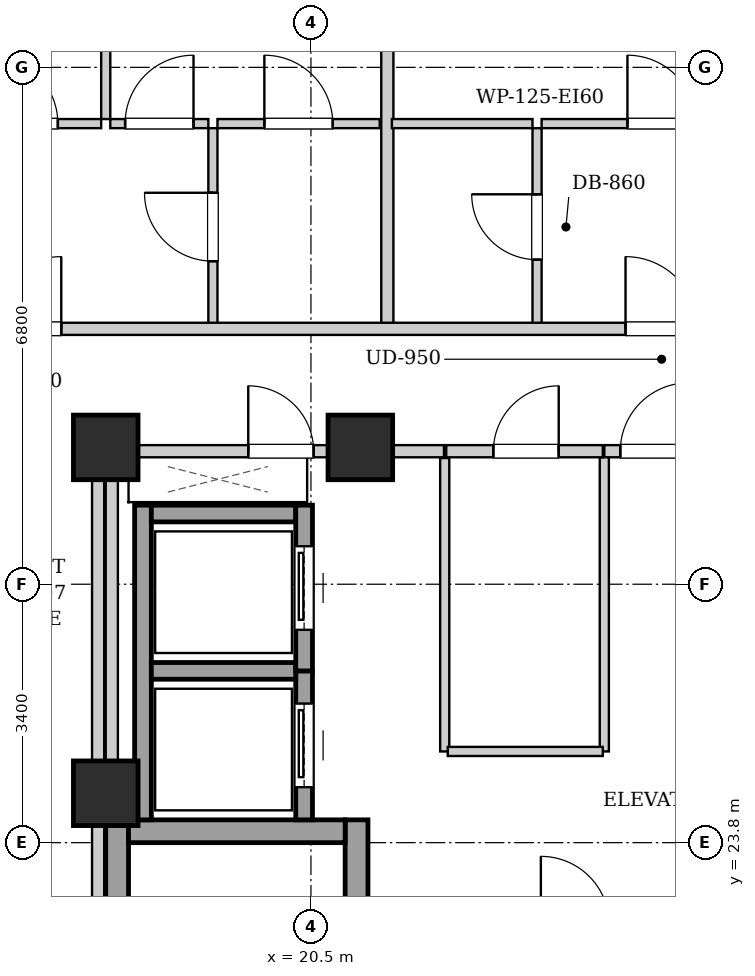
"""IFC4 building model, lengths in metres.
Left out: names, types, materials, properties, quantities, classifications, styles, units other than length and angle.
Written with IfcOpenShell. Run it as: python <this file> out.ifc"""

import sys

from ifc_helpers import new_model, si_unit, direction, frame, frame_2d, origin, origin_2d, place, context, subcontext, project, spatial, rectangle, extrude, element, fill, save


model = new_model("IFC4")
c1 = context("Model", 3, precision=1e-05, world=origin(), true_north=direction((0.0, 1.0)))
c2 = subcontext(c1, "Body", "Model", "MODEL_VIEW")
j1 = project(units=[si_unit("LENGTHUNIT", "METRE"), si_unit("PLANEANGLEUNIT", "RADIAN")], contexts=[c1])
p1 = place(None, origin())
s1 = spatial("IfcSite", under=j1, at=p1, CompositionType="ELEMENT")
p2 = place(p1, origin())
s2 = spatial("IfcBuilding", under=s1, at=p2, CompositionType="ELEMENT")
p3 = place(p2, frame((0.0, 0.0, 214.0)))
s3 = spatial("IfcBuildingStorey", under=s2, at=p3, CompositionType="ELEMENT", Elevation=214.0)
for number, where, z_axis, x_axis in (
    (1, (17.8, 29.0, 0.0), (0.0, 0.0, 1.0), (1.0, 0.0, 0.0)),
    (2, (21.15, 29.0, 0.0), (0.0, 0.0, 1.0), (1.0, 0.0, 0.0)),
    (3, (17.8, 24.45, 0.0), (0.0, 0.0, 1.0), (1.0, 0.0, 0.0)),
):
    element("IfcColumn", number, at=place(p3, frame(where, z_axis=z_axis, x_axis=x_axis)), inside=s3, PredefinedType="COLUMN", context=c2, shape_type="SweptSolid", body=[
        extrude(rectangle(XDim=0.85, YDim=0.85, at=origin_2d()), origin(), (0.0, 0.0, 1.0), 3.3),
    ])
for number, where, z_axis, x_axis in (
    (4, (17.95, 15.1, 0.0), (0.0, 0.0, 1.0), (0.0, 1.0, 0.0)),
    (5, (21.1, 15.1, 0.0), (0.0, 0.0, 1.0), (0.0, 1.0, 0.0)),
):
    element("IfcWall", number, at=place(p3, frame(where, z_axis=z_axis, x_axis=x_axis)), inside=s3, PredefinedType="SHEAR", context=c2, shape_type="SweptSolid", body=[
        extrude(rectangle(XDim=9.0, YDim=0.3, at=frame_2d((4.5, 0.0))), origin(), (0.0, 0.0, 1.0), 3.04),
    ])
p4 = place(p3, frame((18.1, 23.95, 0.0), z_axis=(0.0, 0.0, 1.0), x_axis=(1.0, 0.0, 0.0)))
e6 = element("IfcWall", 6, at=p4, inside=s3, PredefinedType="SHEAR", context=c2, shape_type="SweptSolid", body=[
    extrude(rectangle(XDim=2.85, YDim=0.3, at=frame_2d((1.425, 0.0))), origin(), (0.0, 0.0, 1.0), 3.04),
])
p5 = place(p3, frame((18.29, 24.1, 0.0), z_axis=(0.0, 0.0, 1.0), x_axis=(0.0, 1.0, 0.0)))
e7 = element("IfcWall", 7, at=p5, inside=s3, PredefinedType="SHEAR", context=c2, shape_type="SweptSolid", body=[
    extrude(rectangle(XDim=4.14, YDim=0.22, at=frame_2d((2.07, 0.0))), origin(), (0.0, 0.0, 1.0), 3.04),
])
p6 = place(p3, frame((20.41, 24.1, 0.0), z_axis=(0.0, 0.0, 1.0), x_axis=(0.0, 1.0, 0.0)))
e8 = element("IfcWall", 8, at=p6, inside=s3, PredefinedType="SHEAR", context=c2, shape_type="SweptSolid", body=[
    extrude(rectangle(XDim=1.96, YDim=0.22, at=frame_2d((0.98, 0.0))), origin(), (0.0, 0.0, 1.0), 3.04),
])
p7 = place(p6, frame((0.43, 0.0, 0.0)))
e9 = element("IfcOpeningElement", 9, at=p7, cuts=e8, PredefinedType="OPENING", context=c2, shape_type="SweptSolid", body=[
    extrude(rectangle(XDim=1.1, YDim=2.15, at=frame_2d((0.55, 1.075))), frame((0.0, 0.12, 0.0), z_axis=(0.0, -1.0, 0.0), x_axis=(1.0, 0.0, 0.0)), (0.0, 0.0, 1.0), 0.24),
])
for number, where, z_axis, x_axis in (
    (10, (18.4, 26.06, 0.0), (0.0, 0.0, 1.0), (1.0, 0.0, 0.0)),
    (11, (18.4, 28.13, 0.0), (0.0, 0.0, 1.0), (1.0, 0.0, 0.0)),
):
    element("IfcWall", number, at=place(p3, frame(where, z_axis=z_axis, x_axis=x_axis)), inside=s3, PredefinedType="SHEAR", context=c2, shape_type="SweptSolid", body=[
        extrude(rectangle(XDim=1.9, YDim=0.22, at=frame_2d((0.95, 0.0))), origin(), (0.0, 0.0, 1.0), 3.04),
    ])
p8 = place(p3, frame((20.41, 26.06, 0.0), z_axis=(0.0, 0.0, 1.0), x_axis=(0.0, 1.0, 0.0)))
e12 = element("IfcWall", 12, at=p8, inside=s3, PredefinedType="SHEAR", context=c2, shape_type="SweptSolid", body=[
    extrude(rectangle(XDim=2.18, YDim=0.22, at=frame_2d((1.09, 0.0))), origin(), (0.0, 0.0, 1.0), 3.04),
])
p9 = place(p8, frame((0.54, 0.0, 0.0)))
e13 = element("IfcOpeningElement", 13, at=p9, cuts=e12, PredefinedType="OPENING", context=c2, shape_type="SweptSolid", body=[
    extrude(rectangle(XDim=1.1, YDim=2.15, at=frame_2d((0.55, 1.075))), frame((0.0, 0.12, 0.0), z_axis=(0.0, -1.0, 0.0), x_axis=(1.0, 0.0, 0.0)), (0.0, 0.0, 1.0), 0.24),
])
p10 = place(p3, frame((17.88, 24.12, 0.0), z_axis=(0.0, 0.0, 1.0), x_axis=(0.0, 1.0, 0.0)))
e14 = element("IfcWall", 14, at=p10, inside=s3, PredefinedType="PARTITIONING", context=c2, shape_type="SweptSolid", body=[
    extrude(rectangle(XDim=4.76, YDim=0.16, at=frame_2d((2.38, 0.0))), origin(), (0.0, 0.0, 1.0), 3.04),
])
p11 = place(p3, frame((24.36, 28.95, 0.0), z_axis=(0.0, 0.0, 1.0), x_axis=(1.0, 0.0, 0.0)))
e15 = element("IfcWall", 15, at=p11, inside=s3, PredefinedType="PARTITIONING", context=c2, shape_type="SweptSolid", body=[
    extrude(rectangle(XDim=1.32, YDim=0.16, at=frame_2d((0.66, 0.0))), origin(), (0.0, 0.0, 1.0), 2.556),
])
p12 = place(p11, frame((0.21, 0.0, 0.0)))
e16 = element("IfcOpeningElement", 16, at=p12, cuts=e15, PredefinedType="OPENING", context=c2, shape_type="SweptSolid", body=[
    extrude(rectangle(XDim=0.9, YDim=2.05, at=frame_2d((0.45, 1.025))), frame((0.0, 0.09, 0.0), z_axis=(0.0, -1.0, 0.0), x_axis=(1.0, 0.0, 0.0)), (0.0, 0.0, 1.0), 0.18),
])
p13 = place(p3, frame((17.96, 28.95, 0.0), z_axis=(0.0, 0.0, 1.0), x_axis=(1.0, 0.0, 0.0)))
e17 = element("IfcWall", 17, at=p13, inside=s3, PredefinedType="PARTITIONING", context=c2, shape_type="SweptSolid", body=[
    extrude(rectangle(XDim=4.29, YDim=0.16, at=frame_2d((2.145, 0.0))), origin(), (0.0, 0.0, 1.0), 2.556),
])
p14 = place(p13, frame((1.715, 0.0, 0.0)))
e18 = element("IfcOpeningElement", 18, at=p14, cuts=e17, PredefinedType="OPENING", context=c2, shape_type="SweptSolid", body=[
    extrude(rectangle(XDim=0.86, YDim=2.05, at=frame_2d((0.43, 1.025))), frame((0.0, 0.09, 0.0), z_axis=(0.0, -1.0, 0.0), x_axis=(1.0, 0.0, 0.0)), (0.0, 0.0, 1.0), 0.18),
])
p15 = place(p3, frame((24.36, 25.0, 0.0), z_axis=(0.0, 0.0, 1.0), x_axis=(0.0, 1.0, 0.0)))
e19 = element("IfcWall", 19, at=p15, inside=s3, PredefinedType="PARTITIONING", context=c2, shape_type="SweptSolid", body=[
    extrude(rectangle(XDim=3.87, YDim=0.12, at=frame_2d((1.935, 0.0))), origin(), (0.0, 0.0, 1.0), 3.04),
])
p16 = place(p3, frame((22.26, 25.0, 0.0), z_axis=(0.0, 0.0, 1.0), x_axis=(0.0, 1.0, 0.0)))
e20 = element("IfcWall", 20, at=p16, inside=s3, PredefinedType="PARTITIONING", context=c2, shape_type="SweptSolid", body=[
    extrude(rectangle(XDim=3.86, YDim=0.12, at=frame_2d((1.93, 0.0))), origin(), (0.0, 0.0, 1.0), 3.04),
])
p17 = place(p3, frame((22.3, 25.0, 0.0), z_axis=(0.0, 0.0, 1.0), x_axis=(1.0, 0.0, 0.0)))
e21 = element("IfcWall", 21, at=p17, inside=s3, PredefinedType="PARTITIONING", context=c2, shape_type="SweptSolid", body=[
    extrude(rectangle(XDim=2.04, YDim=0.12, at=frame_2d((1.02, 0.0))), origin(), (0.0, 0.0, 1.0), 3.04),
])
p18 = place(p3, frame((22.28, 28.95, 0.0), z_axis=(0.0, 0.0, 1.0), x_axis=(1.0, 0.0, 0.0)))
e22 = element("IfcWall", 22, at=p18, inside=s3, PredefinedType="PARTITIONING", context=c2, shape_type="SweptSolid", body=[
    extrude(rectangle(XDim=2.06, YDim=0.16, at=frame_2d((1.03, 0.0))), origin(), (0.0, 0.0, 1.0), 2.556),
])
p19 = place(p18, frame((0.62, 0.0, 0.0)))
e23 = element("IfcOpeningElement", 23, at=p19, cuts=e22, PredefinedType="OPENING", context=c2, shape_type="SweptSolid", body=[
    extrude(rectangle(XDim=0.86, YDim=2.05, at=frame_2d((0.43, 1.025))), frame((0.0, 0.09, 0.0), z_axis=(0.0, -1.0, 0.0), x_axis=(1.0, 0.0, 0.0)), (0.0, 0.0, 1.0), 0.18),
])
p20 = place(p3, frame((19.21, 30.6, 0.0), z_axis=(0.0, 0.0, 1.0), x_axis=(0.0, 1.0, 0.0)))
e24 = element("IfcWall", 24, at=p20, inside=s3, PredefinedType="PARTITIONING", context=c2, shape_type="SweptSolid", body=[
    extrude(rectangle(XDim=2.6, YDim=0.12, at=frame_2d((1.3, 0.0))), origin(), (0.0, 0.0, 1.0), 3.04),
])
p21 = place(p20, frame((0.85, 0.0, 0.0)))
e25 = element("IfcOpeningElement", 25, at=p21, cuts=e24, PredefinedType="OPENING", context=c2, shape_type="SweptSolid", body=[
    extrude(rectangle(XDim=0.9, YDim=2.05, at=frame_2d((0.45, 1.025))), frame((0.0, 0.07, 0.0), z_axis=(0.0, -1.0, 0.0), x_axis=(1.0, 0.0, 0.0)), (0.0, 0.0, 1.0), 0.14),
])
p22 = place(p3, frame((15.7, 33.26, 0.0), z_axis=(0.0, 0.0, 1.0), x_axis=(1.0, 0.0, 0.0)))
e26 = element("IfcWall", 26, at=p22, inside=s3, PredefinedType="PARTITIONING", context=c2, shape_type="SweptSolid", body=[
    extrude(rectangle(XDim=2.04, YDim=0.12, at=frame_2d((1.02, 0.0))), origin(), (0.0, 0.0, 1.0), 3.04),
])
p23 = place(p22, frame((0.57, 0.0, 0.0)))
e27 = element("IfcOpeningElement", 27, at=p23, cuts=e26, PredefinedType="OPENING", context=c2, shape_type="SweptSolid", body=[
    extrude(rectangle(XDim=0.9, YDim=2.05, at=frame_2d((0.45, 1.025))), frame((0.0, 0.07, 0.0), z_axis=(0.0, -1.0, 0.0), x_axis=(1.0, 0.0, 0.0)), (0.0, 0.0, 1.0), 0.14),
])
p24 = place(p3, frame((17.86, 33.26, 0.0), z_axis=(0.0, 0.0, 1.0), x_axis=(1.0, 0.0, 0.0)))
e28 = element("IfcWall", 28, at=p24, inside=s3, PredefinedType="PARTITIONING", context=c2, shape_type="SweptSolid", body=[
    extrude(rectangle(XDim=1.29, YDim=0.12, at=frame_2d((0.645, 0.0))), origin(), (0.0, 0.0, 1.0), 3.04),
])
p25 = place(p24, frame((0.195, 0.0, 0.0)))
e29 = element("IfcOpeningElement", 29, at=p25, cuts=e28, PredefinedType="OPENING", context=c2, shape_type="SweptSolid", body=[
    extrude(rectangle(XDim=0.9, YDim=2.05, at=frame_2d((0.45, 1.025))), frame((0.0, 0.07, 0.0), z_axis=(0.0, -1.0, 0.0), x_axis=(1.0, 0.0, 0.0)), (0.0, 0.0, 1.0), 0.14),
])
p26 = place(p3, frame((19.27, 33.26, 0.0), z_axis=(0.0, 0.0, 1.0), x_axis=(1.0, 0.0, 0.0)))
e30 = element("IfcWall", 30, at=p26, inside=s3, PredefinedType="PARTITIONING", context=c2, shape_type="SweptSolid", body=[
    extrude(rectangle(XDim=2.135, YDim=0.12, at=frame_2d((1.067, 0.0))), origin(), (0.0, 0.0, 1.0), 3.04),
])
p27 = place(p26, frame((0.617, 0.0, 0.0)))
e31 = element("IfcOpeningElement", 31, at=p27, cuts=e30, PredefinedType="OPENING", context=c2, shape_type="SweptSolid", body=[
    extrude(rectangle(XDim=0.9, YDim=2.05, at=frame_2d((0.45, 1.025))), frame((0.0, 0.07, 0.0), z_axis=(0.0, -1.0, 0.0), x_axis=(1.0, 0.0, 0.0)), (0.0, 0.0, 1.0), 0.14),
])
p28 = place(p3, frame((17.8, 33.32, 0.0), z_axis=(0.0, 0.0, 1.0), x_axis=(0.0, 1.0, 0.0)))
e32 = element("IfcWall", 32, at=p28, inside=s3, PredefinedType="PARTITIONING", context=c2, shape_type="SweptSolid", body=[
    extrude(rectangle(XDim=6.6, YDim=0.12, at=frame_2d((3.3, 0.0))), origin(), (0.0, 0.0, 1.0), 2.556),
])
p29 = place(p28, frame((2.835, 0.0, 0.0)))
e33 = element("IfcOpeningElement", 33, at=p29, cuts=e32, PredefinedType="OPENING", context=c2, shape_type="SweptSolid", body=[
    extrude(rectangle(XDim=0.9, YDim=2.05, at=frame_2d((0.45, 1.025))), frame((0.0, 0.07, 0.0), z_axis=(0.0, -1.0, 0.0), x_axis=(1.0, 0.0, 0.0)), (0.0, 0.0, 1.0), 0.14),
])
p30 = place(p3, frame((21.505, 30.6, 0.0), z_axis=(0.0, 0.0, 1.0), x_axis=(0.0, 1.0, 0.0)))
e34 = element("IfcWall", 34, at=p30, inside=s3, PredefinedType="PARTITIONING", context=c2, shape_type="SweptSolid", body=[
    extrude(rectangle(XDim=9.32, YDim=0.16, at=frame_2d((4.66, 0.0))), origin(), (0.0, 0.0, 1.0), 3.04),
])
p31 = place(p3, frame((23.475, 30.6, 0.0), z_axis=(0.0, 0.0, 1.0), x_axis=(0.0, 1.0, 0.0)))
e35 = element("IfcWall", 35, at=p31, inside=s3, PredefinedType="PARTITIONING", context=c2, shape_type="SweptSolid", body=[
    extrude(rectangle(XDim=2.6, YDim=0.12, at=frame_2d((1.3, 0.0))), origin(), (0.0, 0.0, 1.0), 3.04),
])
p32 = place(p31, frame((0.87, 0.0, 0.0)))
e36 = element("IfcOpeningElement", 36, at=p32, cuts=e35, PredefinedType="OPENING", context=c2, shape_type="SweptSolid", body=[
    extrude(rectangle(XDim=0.86, YDim=2.05, at=frame_2d((0.43, 1.025))), frame((0.0, 0.07, 0.0), z_axis=(0.0, -1.0, 0.0), x_axis=(1.0, 0.0, 0.0)), (0.0, 0.0, 1.0), 0.14),
])
p33 = place(p3, frame((21.565, 33.26, 0.0), z_axis=(0.0, 0.0, 1.0), x_axis=(1.0, 0.0, 0.0)))
e37 = element("IfcWall", 37, at=p33, inside=s3, PredefinedType="PARTITIONING", context=c2, shape_type="SweptSolid", body=[
    extrude(rectangle(XDim=1.85, YDim=0.12, at=frame_2d((0.925, 0.0))), origin(), (0.0, 0.0, 1.0), 3.04),
])
p34 = place(p3, frame((23.535, 33.26, 0.0), z_axis=(0.0, 0.0, 1.0), x_axis=(1.0, 0.0, 0.0)))
e38 = element("IfcWall", 38, at=p34, inside=s3, PredefinedType="PARTITIONING", context=c2, shape_type="SweptSolid", body=[
    extrude(rectangle(XDim=3.157, YDim=0.12, at=frame_2d((1.579, 0.0))), origin(), (0.0, 0.0, 1.0), 3.04),
])
p35 = place(p34, frame((1.129, 0.0, 0.0)))
e39 = element("IfcOpeningElement", 39, at=p35, cuts=e38, PredefinedType="OPENING", context=c2, shape_type="SweptSolid", body=[
    extrude(rectangle(XDim=0.9, YDim=2.05, at=frame_2d((0.45, 1.025))), frame((0.0, 0.07, 0.0), z_axis=(0.0, -1.0, 0.0), x_axis=(1.0, 0.0, 0.0)), (0.0, 0.0, 1.0), 0.14),
])
p36 = place(p3, frame((13.15, 30.56, 0.0), z_axis=(0.0, 0.0, 1.0), x_axis=(1.0, 0.0, 0.0)))
e40 = element("IfcWall", 40, at=p36, inside=s3, PredefinedType="PARTITIONING", context=c2, shape_type="SweptSolid", body=[
    extrude(rectangle(XDim=24.6, YDim=0.16, at=frame_2d((12.3, 0.0))), origin(), (0.0, 0.0, 1.0), 3.04),
])
p37 = place(p36, frame((3.115, 0.0, 0.0)))
e41 = element("IfcOpeningElement", 41, at=p37, cuts=e40, PredefinedType="OPENING", context=c2, shape_type="SweptSolid", body=[
    extrude(rectangle(XDim=0.95, YDim=2.1, at=frame_2d((0.475, 1.05))), frame((0.0, 0.09, 0.0), z_axis=(0.0, -1.0, 0.0), x_axis=(1.0, 0.0, 0.0)), (0.0, 0.0, 1.0), 0.18),
])
p38 = place(p36, frame((11.489, 0.0, 0.0)))
e42 = element("IfcOpeningElement", 42, at=p38, cuts=e40, PredefinedType="OPENING", context=c2, shape_type="SweptSolid", body=[
    extrude(rectangle(XDim=0.95, YDim=2.1, at=frame_2d((0.475, 1.05))), frame((0.0, 0.09, 0.0), z_axis=(0.0, -1.0, 0.0), x_axis=(1.0, 0.0, 0.0)), (0.0, 0.0, 1.0), 0.18),
])
p39 = place(p36, frame((17.707, 0.0, 0.0)))
e43 = element("IfcOpeningElement", 43, at=p39, cuts=e40, PredefinedType="OPENING", context=c2, shape_type="SweptSolid", body=[
    extrude(rectangle(XDim=0.95, YDim=2.1, at=frame_2d((0.475, 1.05))), frame((0.0, 0.09, 0.0), z_axis=(0.0, -1.0, 0.0), x_axis=(1.0, 0.0, 0.0)), (0.0, 0.0, 1.0), 0.18),
])
p40 = place(p3, frame((17.7, 15.02, 0.0), z_axis=(0.0, 0.0, 1.0), x_axis=(0.0, 1.0, 0.0)))
e44 = element("IfcWall", 44, at=p40, inside=s3, PredefinedType="PARTITIONING", context=c2, shape_type="SweptSolid", body=[
    extrude(rectangle(XDim=13.98, YDim=0.16, at=frame_2d((6.99, 0.0))), origin(), (0.0, 0.0, 1.0), 3.04),
])
p41 = place(p7, origin())
e45 = element("IfcDoor", 45, at=p41, inside=s3, OperationType="SLIDING_TO_LEFT", PredefinedType="DOOR", context=c2, shape_type="SweptSolid", body=[
    extrude(rectangle(XDim=1.1, YDim=2.15, at=frame_2d((0.55, 1.075))), frame((0.0, 0.025, 0.0), z_axis=(0.0, -1.0, 0.0), x_axis=(1.0, 0.0, 0.0)), (0.0, 0.0, 1.0), 0.05),
])
fill(e9, e45)
p42 = place(p9, origin())
e46 = element("IfcDoor", 46, at=p42, inside=s3, OperationType="SLIDING_TO_LEFT", PredefinedType="DOOR", context=c2, shape_type="SweptSolid", body=[
    extrude(rectangle(XDim=1.1, YDim=2.15, at=frame_2d((0.55, 1.075))), frame((0.0, 0.025, 0.0), z_axis=(0.0, -1.0, 0.0), x_axis=(1.0, 0.0, 0.0)), (0.0, 0.0, 1.0), 0.05),
])
fill(e13, e46)
p43 = place(p12, origin())
e47 = element("IfcDoor", 47, at=p43, inside=s3, OperationType="SINGLE_SWING_RIGHT", PredefinedType="DOOR", context=c2, shape_type="SweptSolid", body=[
    extrude(rectangle(XDim=0.9, YDim=2.05, at=frame_2d((0.45, 1.025))), frame((0.0, 0.025, 0.0), z_axis=(0.0, -1.0, 0.0), x_axis=(1.0, 0.0, 0.0)), (0.0, 0.0, 1.0), 0.05),
])
fill(e16, e47)
p44 = place(p14, origin())
e48 = element("IfcDoor", 48, at=p44, inside=s3, OperationType="SINGLE_SWING_LEFT", PredefinedType="DOOR", context=c2, shape_type="SweptSolid", body=[
    extrude(rectangle(XDim=0.86, YDim=2.05, at=frame_2d((0.43, 1.025))), frame((0.0, 0.025, 0.0), z_axis=(0.0, -1.0, 0.0), x_axis=(1.0, 0.0, 0.0)), (0.0, 0.0, 1.0), 0.05),
])
fill(e18, e48)
p45 = place(p19, origin())
e49 = element("IfcDoor", 49, at=p45, inside=s3, OperationType="SINGLE_SWING_RIGHT", PredefinedType="DOOR", context=c2, shape_type="SweptSolid", body=[
    extrude(rectangle(XDim=0.86, YDim=2.05, at=frame_2d((0.43, 1.025))), frame((0.0, 0.025, 0.0), z_axis=(0.0, -1.0, 0.0), x_axis=(1.0, 0.0, 0.0)), (0.0, 0.0, 1.0), 0.05),
])
fill(e23, e49)
p46 = place(p21, origin())
e50 = element("IfcDoor", 50, at=p46, inside=s3, OperationType="SINGLE_SWING_RIGHT", PredefinedType="DOOR", context=c2, shape_type="SweptSolid", body=[
    extrude(rectangle(XDim=0.9, YDim=2.05, at=frame_2d((0.45, 1.025))), frame((0.0, 0.025, 0.0), z_axis=(0.0, -1.0, 0.0), x_axis=(1.0, 0.0, 0.0)), (0.0, 0.0, 1.0), 0.05),
])
fill(e25, e50)
p47 = place(p23, origin())
e51 = element("IfcDoor", 51, at=p47, inside=s3, OperationType="SINGLE_SWING_LEFT", PredefinedType="DOOR", context=c2, shape_type="SweptSolid", body=[
    extrude(rectangle(XDim=0.9, YDim=2.05, at=frame_2d((0.45, 1.025))), frame((0.0, 0.025, 0.0), z_axis=(0.0, -1.0, 0.0), x_axis=(1.0, 0.0, 0.0)), (0.0, 0.0, 1.0), 0.05),
])
fill(e27, e51)
p48 = place(p25, origin())
e52 = element("IfcDoor", 52, at=p48, inside=s3, OperationType="SINGLE_SWING_RIGHT", PredefinedType="DOOR", context=c2, shape_type="SweptSolid", body=[
    extrude(rectangle(XDim=0.9, YDim=2.05, at=frame_2d((0.45, 1.025))), frame((0.0, 0.025, 0.0), z_axis=(0.0, -1.0, 0.0), x_axis=(1.0, 0.0, 0.0)), (0.0, 0.0, 1.0), 0.05),
])
fill(e29, e52)
p49 = place(p27, origin())
e53 = element("IfcDoor", 53, at=p49, inside=s3, OperationType="SINGLE_SWING_LEFT", PredefinedType="DOOR", context=c2, shape_type="SweptSolid", body=[
    extrude(rectangle(XDim=0.9, YDim=2.05, at=frame_2d((0.45, 1.025))), frame((0.0, 0.025, 0.0), z_axis=(0.0, -1.0, 0.0), x_axis=(1.0, 0.0, 0.0)), (0.0, 0.0, 1.0), 0.05),
])
fill(e31, e53)
p50 = place(p32, origin())
e54 = element("IfcDoor", 54, at=p50, inside=s3, OperationType="SINGLE_SWING_RIGHT", PredefinedType="DOOR", context=c2, shape_type="SweptSolid", body=[
    extrude(rectangle(XDim=0.86, YDim=2.05, at=frame_2d((0.43, 1.025))), frame((0.0, 0.025, 0.0), z_axis=(0.0, -1.0, 0.0), x_axis=(1.0, 0.0, 0.0)), (0.0, 0.0, 1.0), 0.05),
])
fill(e36, e54)
p51 = place(p35, origin())
e55 = element("IfcDoor", 55, at=p51, inside=s3, OperationType="SINGLE_SWING_LEFT", PredefinedType="DOOR", context=c2, shape_type="SweptSolid", body=[
    extrude(rectangle(XDim=0.9, YDim=2.05, at=frame_2d((0.45, 1.025))), frame((0.0, 0.025, 0.0), z_axis=(0.0, -1.0, 0.0), x_axis=(1.0, 0.0, 0.0)), (0.0, 0.0, 1.0), 0.05),
])
fill(e39, e55)
p52 = place(p37, origin())
e56 = element("IfcDoor", 56, at=p52, inside=s3, OperationType="SINGLE_SWING_RIGHT", PredefinedType="DOOR", context=c2, shape_type="SweptSolid", body=[
    extrude(rectangle(XDim=0.95, YDim=2.1, at=frame_2d((0.475, 1.05))), frame((0.0, 0.025, 0.0), z_axis=(0.0, -1.0, 0.0), x_axis=(1.0, 0.0, 0.0)), (0.0, 0.0, 1.0), 0.05),
])
fill(e41, e56)
p53 = place(p38, origin())
e57 = element("IfcDoor", 57, at=p53, inside=s3, OperationType="SINGLE_SWING_LEFT", PredefinedType="DOOR", context=c2, shape_type="SweptSolid", body=[
    extrude(rectangle(XDim=0.95, YDim=2.1, at=frame_2d((0.475, 1.05))), frame((0.0, 0.025, 0.0), z_axis=(0.0, -1.0, 0.0), x_axis=(1.0, 0.0, 0.0)), (0.0, 0.0, 1.0), 0.05),
])
fill(e42, e57)
save(model, sys.argv[1])
